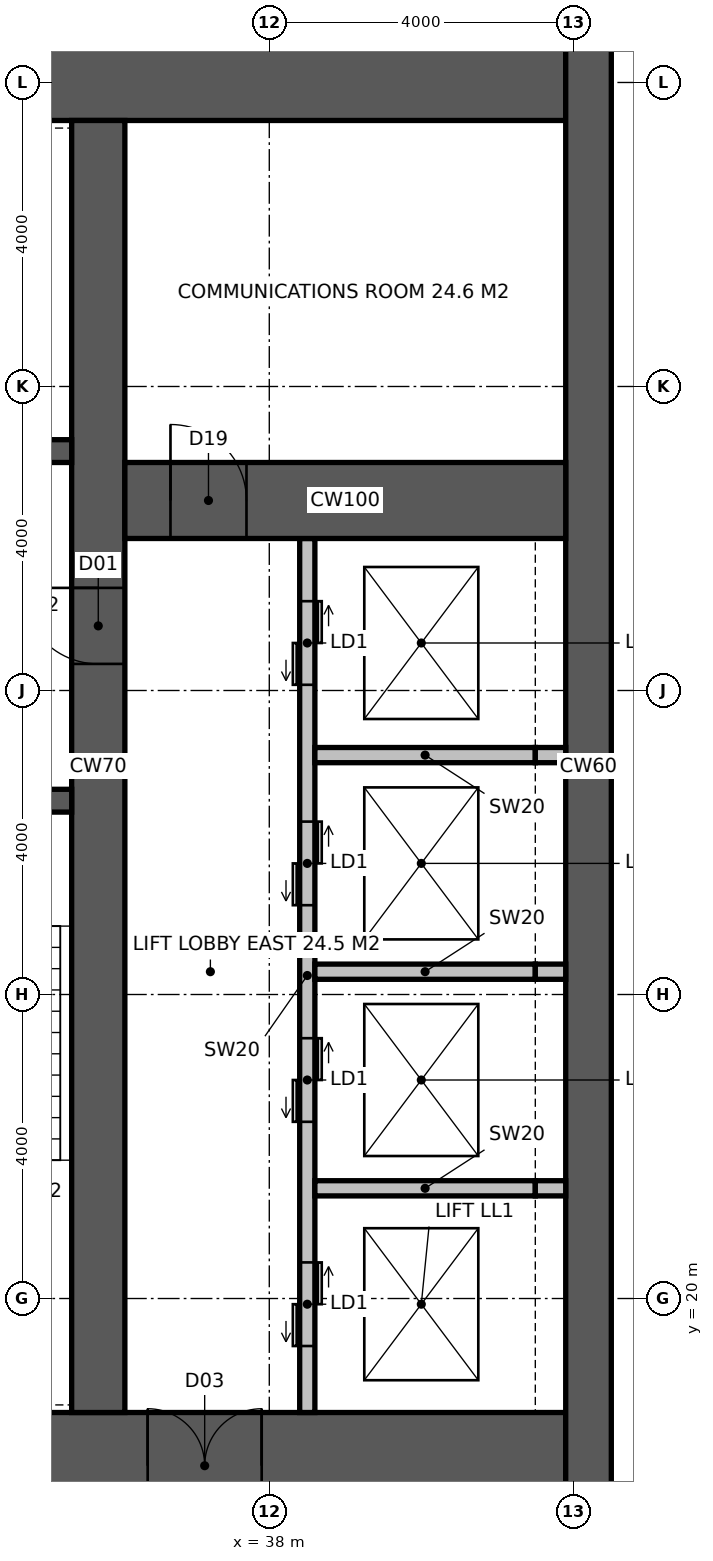
"""IFC4 building model, lengths in metres.
Left out: names, types, materials, properties, quantities, classifications, styles, units other than length and angle.
Written with IfcOpenShell. Run it as: python <this file> out.ifc"""

import sys

from ifc_helpers import new_model, si_unit, direction, frame, frame_2d, origin, place, context, subcontext, project, spatial, rectangle, extrude, element, fill, save


model = new_model("IFC4")
c1 = context("Model", 3, precision=1e-05, world=origin(), true_north=direction((0.0, 1.0)))
c2 = subcontext(c1, "Body", "Model", "MODEL_VIEW")
j1 = project(units=[si_unit("LENGTHUNIT", "METRE"), si_unit("PLANEANGLEUNIT", "RADIAN")], contexts=[c1])
p1 = place(None, origin())
s1 = spatial("IfcSite", under=j1, at=p1, CompositionType="ELEMENT")
p2 = place(p1, origin())
s2 = spatial("IfcBuilding", under=s1, at=p2, CompositionType="ELEMENT")
p3 = place(p2, frame((0.0, 0.0, 47.0)))
s3 = spatial("IfcBuildingStorey", under=s2, at=p3, CompositionType="ELEMENT", Elevation=47.0)
p4 = place(p3, frame((18.5, 17.8, -0.15), z_axis=(0.0, 0.0, 1.0), x_axis=(1.0, 0.0, 0.0)))
e1 = element("IfcWall", 1, at=p4, inside=s3, PredefinedType="SHEAR", context=c2, shape_type="SweptSolid", body=[
    extrude(rectangle(XDim=23.4, YDim=1.4, at=frame_2d((11.7, 0.0))), origin(), (0.0, 0.0, 1.0), 4.0),
])
p5 = place(p4, frame((3.45, 0.0, 0.15)))
e2 = element("IfcOpeningElement", 2, at=p5, cuts=e1, PredefinedType="OPENING", context=c2, shape_type="SweptSolid", body=[
    extrude(rectangle(XDim=1.5, YDim=2.4, at=frame_2d((0.75, 1.2))), frame((0.0, 0.71, 0.0), z_axis=(0.0, -1.0, 0.0), x_axis=(1.0, 0.0, 0.0)), (0.0, 0.0, 1.0), 1.42),
])
p6 = place(p4, frame((17.9, 0.0, 0.15)))
e3 = element("IfcOpeningElement", 3, at=p6, cuts=e1, PredefinedType="OPENING", context=c2, shape_type="SweptSolid", body=[
    extrude(rectangle(XDim=1.5, YDim=2.4, at=frame_2d((0.75, 1.2))), frame((0.0, 0.71, 0.0), z_axis=(0.0, -1.0, 0.0), x_axis=(1.0, 0.0, 0.0)), (0.0, 0.0, 1.0), 1.42),
])
p7 = place(p4, frame((0.9, 0.0, 0.15)))
e4 = element("IfcOpeningElement", 4, at=p7, cuts=e1, PredefinedType="OPENING", context=c2, shape_type="SweptSolid", body=[
    extrude(rectangle(XDim=1.0, YDim=2.2, at=frame_2d((0.5, 1.1))), frame((0.0, 0.71, 0.0), z_axis=(0.0, -1.0, 0.0), x_axis=(1.0, 0.0, 0.0)), (0.0, 0.0, 1.0), 1.42),
])
p8 = place(p3, frame((18.5, 36.2, -0.15), z_axis=(0.0, 0.0, 1.0), x_axis=(1.0, 0.0, 0.0)))
e5 = element("IfcWall", 5, at=p8, inside=s3, PredefinedType="SHEAR", context=c2, shape_type="SweptSolid", body=[
    extrude(rectangle(XDim=23.4, YDim=1.4, at=frame_2d((11.7, 0.0))), origin(), (0.0, 0.0, 1.0), 4.0),
])
p9 = place(p3, frame((42.2, 17.1, -0.15), z_axis=(0.0, 0.0, 1.0), x_axis=(0.0, 1.0, 0.0)))
e6 = element("IfcWall", 6, at=p9, inside=s3, PredefinedType="SHEAR", context=c2, shape_type="SweptSolid", body=[
    extrude(rectangle(XDim=19.8, YDim=0.6, at=frame_2d((9.9, 0.0))), origin(), (0.0, 0.0, 1.0), 4.0),
])
p10 = place(p3, frame((35.75, 18.5, -0.15), z_axis=(0.0, 0.0, 1.0), x_axis=(0.0, 1.0, 0.0)))
e7 = element("IfcWall", 7, at=p10, inside=s3, PredefinedType="SHEAR", context=c2, shape_type="SweptSolid", body=[
    extrude(rectangle(XDim=17.0, YDim=0.7, at=frame_2d((8.5, 0.0))), origin(), (0.0, 0.0, 1.0), 4.0),
])
p11 = place(p10, frame((9.85, 0.0, 0.15)))
e8 = element("IfcOpeningElement", 8, at=p11, cuts=e7, PredefinedType="OPENING", context=c2, shape_type="SweptSolid", body=[
    extrude(rectangle(XDim=1.0, YDim=2.2, at=frame_2d((0.5, 1.1))), frame((0.0, 0.36, 0.0), z_axis=(0.0, -1.0, 0.0), x_axis=(1.0, 0.0, 0.0)), (0.0, 0.0, 1.0), 0.72),
])
p12 = place(p3, frame((24.15, 26.55, -0.15), z_axis=(0.0, 0.0, 1.0), x_axis=(1.0, 0.0, 0.0)))
e9 = element("IfcWall", 9, at=p12, inside=s3, PredefinedType="SHEAR", context=c2, shape_type="SweptSolid", body=[
    extrude(rectangle(XDim=11.25, YDim=0.3, at=frame_2d((5.625, 0.0))), origin(), (0.0, 0.0, 1.0), 4.0),
])
p13 = place(p12, frame((9.25, 0.0, 0.15)))
e10 = element("IfcOpeningElement", 10, at=p13, cuts=e9, PredefinedType="OPENING", context=c2, shape_type="SweptSolid", body=[
    extrude(rectangle(XDim=1.0, YDim=2.2, at=frame_2d((0.5, 1.1))), frame((0.0, 0.16, 0.0), z_axis=(0.0, -1.0, 0.0), x_axis=(1.0, 0.0, 0.0)), (0.0, 0.0, 1.0), 0.32),
])
p14 = place(p12, frame((4.9, 0.0, 0.15)))
e11 = element("IfcOpeningElement", 11, at=p14, cuts=e9, PredefinedType="OPENING", context=c2, shape_type="SweptSolid", body=[
    extrude(rectangle(XDim=1.5, YDim=2.4, at=frame_2d((0.75, 1.2))), frame((0.0, 0.16, 0.0), z_axis=(0.0, -1.0, 0.0), x_axis=(1.0, 0.0, 0.0)), (0.0, 0.0, 1.0), 0.32),
])
p15 = place(p3, frame((24.15, 31.15, -0.15), z_axis=(0.0, 0.0, 1.0), x_axis=(1.0, 0.0, 0.0)))
e12 = element("IfcWall", 12, at=p15, inside=s3, PredefinedType="SHEAR", context=c2, shape_type="SweptSolid", body=[
    extrude(rectangle(XDim=11.25, YDim=0.3, at=frame_2d((5.625, 0.0))), origin(), (0.0, 0.0, 1.0), 4.0),
])
p16 = place(p15, frame((7.25, 0.0, 0.15)))
e13 = element("IfcOpeningElement", 13, at=p16, cuts=e12, PredefinedType="OPENING", context=c2, shape_type="SweptSolid", body=[
    extrude(rectangle(XDim=1.4, YDim=2.4, at=frame_2d((0.7, 1.2))), frame((0.0, 0.16, 0.0), z_axis=(0.0, -1.0, 0.0), x_axis=(1.0, 0.0, 0.0)), (0.0, 0.0, 1.0), 0.32),
])
p17 = place(p3, frame((38.5, 18.5, -0.15), z_axis=(0.0, 0.0, 1.0), x_axis=(0.0, 1.0, 0.0)))
e14 = element("IfcWall", 14, at=p17, inside=s3, PredefinedType="SOLIDWALL", context=c2, shape_type="SweptSolid", body=[
    extrude(rectangle(XDim=11.5, YDim=0.2, at=frame_2d((5.75, 0.0))), origin(), (0.0, 0.0, 1.0), 4.0),
])
p18 = place(p17, frame((0.875, 0.0, 0.15)))
e15 = element("IfcOpeningElement", 15, at=p18, cuts=e14, PredefinedType="OPENING", context=c2, shape_type="SweptSolid", body=[
    extrude(rectangle(XDim=1.1, YDim=2.2, at=frame_2d((0.55, 1.1))), frame((0.0, 0.11, 0.0), z_axis=(0.0, -1.0, 0.0), x_axis=(1.0, 0.0, 0.0)), (0.0, 0.0, 1.0), 0.22),
])
p19 = place(p17, frame((3.825, 0.0, 0.15)))
e16 = element("IfcOpeningElement", 16, at=p19, cuts=e14, PredefinedType="OPENING", context=c2, shape_type="SweptSolid", body=[
    extrude(rectangle(XDim=1.1, YDim=2.2, at=frame_2d((0.55, 1.1))), frame((0.0, 0.11, 0.0), z_axis=(0.0, -1.0, 0.0), x_axis=(1.0, 0.0, 0.0)), (0.0, 0.0, 1.0), 0.22),
])
p20 = place(p17, frame((6.675, 0.0, 0.15)))
e17 = element("IfcOpeningElement", 17, at=p20, cuts=e14, PredefinedType="OPENING", context=c2, shape_type="SweptSolid", body=[
    extrude(rectangle(XDim=1.1, YDim=2.2, at=frame_2d((0.55, 1.1))), frame((0.0, 0.11, 0.0), z_axis=(0.0, -1.0, 0.0), x_axis=(1.0, 0.0, 0.0)), (0.0, 0.0, 1.0), 0.22),
])
p21 = place(p17, frame((9.575, 0.0, 0.15)))
e18 = element("IfcOpeningElement", 18, at=p21, cuts=e14, PredefinedType="OPENING", context=c2, shape_type="SweptSolid", body=[
    extrude(rectangle(XDim=1.1, YDim=2.2, at=frame_2d((0.55, 1.1))), frame((0.0, 0.11, 0.0), z_axis=(0.0, -1.0, 0.0), x_axis=(1.0, 0.0, 0.0)), (0.0, 0.0, 1.0), 0.22),
])
p22 = place(p3, frame((36.1, 30.5, -0.15), z_axis=(0.0, 0.0, 1.0), x_axis=(1.0, 0.0, 0.0)))
e19 = element("IfcWall", 19, at=p22, inside=s3, PredefinedType="SHEAR", context=c2, shape_type="SweptSolid", body=[
    extrude(rectangle(XDim=5.8, YDim=1.0, at=frame_2d((2.9, 0.0))), origin(), (0.0, 0.0, 1.0), 4.0),
])
p23 = place(p22, frame((0.6, 0.0, 0.15)))
e20 = element("IfcOpeningElement", 20, at=p23, cuts=e19, PredefinedType="OPENING", context=c2, shape_type="SweptSolid", body=[
    extrude(rectangle(XDim=1.0, YDim=2.2, at=frame_2d((0.5, 1.1))), frame((0.0, 0.51, 0.0), z_axis=(0.0, -1.0, 0.0), x_axis=(1.0, 0.0, 0.0)), (0.0, 0.0, 1.0), 1.02),
])
p24 = place(p3, frame((38.6, 21.45, -0.15), z_axis=(0.0, 0.0, 1.0), x_axis=(1.0, 0.0, 0.0)))
e21 = element("IfcWall", 21, at=p24, inside=s3, PredefinedType="SOLIDWALL", context=c2, shape_type="SweptSolid", body=[
    extrude(rectangle(XDim=2.9, YDim=0.2, at=frame_2d((1.45, 0.0))), origin(), (0.0, 0.0, 1.0), 4.0),
])
p25 = place(p3, frame((41.5, 21.45, -0.15), z_axis=(0.0, 0.0, 1.0), x_axis=(1.0, 0.0, 0.0)))
e22 = element("IfcWall", 22, at=p25, inside=s3, PredefinedType="SOLIDWALL", context=c2, shape_type="SweptSolid", body=[
    extrude(rectangle(XDim=0.4, YDim=0.2, at=frame_2d((0.2, 0.0))), origin(), (0.0, 0.0, 1.0), 4.0),
])
p26 = place(p3, frame((38.6, 24.3, -0.15), z_axis=(0.0, 0.0, 1.0), x_axis=(1.0, 0.0, 0.0)))
e23 = element("IfcWall", 23, at=p26, inside=s3, PredefinedType="SOLIDWALL", context=c2, shape_type="SweptSolid", body=[
    extrude(rectangle(XDim=2.9, YDim=0.2, at=frame_2d((1.45, 0.0))), origin(), (0.0, 0.0, 1.0), 4.0),
])
p27 = place(p3, frame((41.5, 24.3, -0.15), z_axis=(0.0, 0.0, 1.0), x_axis=(1.0, 0.0, 0.0)))
e24 = element("IfcWall", 24, at=p27, inside=s3, PredefinedType="SOLIDWALL", context=c2, shape_type="SweptSolid", body=[
    extrude(rectangle(XDim=0.4, YDim=0.2, at=frame_2d((0.2, 0.0))), origin(), (0.0, 0.0, 1.0), 4.0),
])
p28 = place(p3, frame((38.6, 27.15, -0.15), z_axis=(0.0, 0.0, 1.0), x_axis=(1.0, 0.0, 0.0)))
e25 = element("IfcWall", 25, at=p28, inside=s3, PredefinedType="SOLIDWALL", context=c2, shape_type="SweptSolid", body=[
    extrude(rectangle(XDim=2.9, YDim=0.2, at=frame_2d((1.45, 0.0))), origin(), (0.0, 0.0, 1.0), 4.0),
])
p29 = place(p3, frame((41.5, 27.15, -0.15), z_axis=(0.0, 0.0, 1.0), x_axis=(1.0, 0.0, 0.0)))
e26 = element("IfcWall", 26, at=p29, inside=s3, PredefinedType="SOLIDWALL", context=c2, shape_type="SweptSolid", body=[
    extrude(rectangle(XDim=0.4, YDim=0.2, at=frame_2d((0.2, 0.0))), origin(), (0.0, 0.0, 1.0), 4.0),
])
p30 = place(p11, origin())
e27 = element("IfcDoor", 27, at=p30, inside=s3, OperationType="SINGLE_SWING_RIGHT", PredefinedType="DOOR", context=c2, shape_type="SweptSolid", body=[
    extrude(rectangle(XDim=1.0, YDim=2.2, at=frame_2d((0.5, 1.1))), frame((0.0, 0.025, 0.0), z_axis=(0.0, -1.0, 0.0), x_axis=(1.0, 0.0, 0.0)), (0.0, 0.0, 1.0), 0.05),
])
fill(e8, e27)
p31 = place(p6, origin())
e28 = element("IfcDoor", 28, at=p31, inside=s3, OperationType="DOUBLE_DOOR_DOUBLE_SWING", PredefinedType="DOOR", context=c2, shape_type="SweptSolid", body=[
    extrude(rectangle(XDim=1.5, YDim=2.4, at=frame_2d((0.75, 1.2))), frame((0.0, 0.025, 0.0), z_axis=(0.0, -1.0, 0.0), x_axis=(1.0, 0.0, 0.0)), (0.0, 0.0, 1.0), 0.05),
])
fill(e3, e28)
p32 = place(p23, origin())
e29 = element("IfcDoor", 29, at=p32, inside=s3, OperationType="SINGLE_SWING_LEFT", PredefinedType="DOOR", context=c2, shape_type="SweptSolid", body=[
    extrude(rectangle(XDim=1.0, YDim=2.2, at=frame_2d((0.5, 1.1))), frame((0.0, 0.025, 0.0), z_axis=(0.0, -1.0, 0.0), x_axis=(1.0, 0.0, 0.0)), (0.0, 0.0, 1.0), 0.05),
])
fill(e20, e29)
p33 = place(p18, origin())
e30 = element("IfcDoor", 30, at=p33, inside=s3, OperationType="DOUBLE_DOOR_SLIDING", PredefinedType="DOOR", context=c2, shape_type="SweptSolid", body=[
    extrude(rectangle(XDim=1.1, YDim=2.2, at=frame_2d((0.55, 1.1))), frame((0.0, 0.025, 0.0), z_axis=(0.0, -1.0, 0.0), x_axis=(1.0, 0.0, 0.0)), (0.0, 0.0, 1.0), 0.05),
])
fill(e15, e30)
p34 = place(p19, origin())
e31 = element("IfcDoor", 31, at=p34, inside=s3, OperationType="DOUBLE_DOOR_SLIDING", PredefinedType="DOOR", context=c2, shape_type="SweptSolid", body=[
    extrude(rectangle(XDim=1.1, YDim=2.2, at=frame_2d((0.55, 1.1))), frame((0.0, 0.025, 0.0), z_axis=(0.0, -1.0, 0.0), x_axis=(1.0, 0.0, 0.0)), (0.0, 0.0, 1.0), 0.05),
])
fill(e16, e31)
p35 = place(p20, origin())
e32 = element("IfcDoor", 32, at=p35, inside=s3, OperationType="DOUBLE_DOOR_SLIDING", PredefinedType="DOOR", context=c2, shape_type="SweptSolid", body=[
    extrude(rectangle(XDim=1.1, YDim=2.2, at=frame_2d((0.55, 1.1))), frame((0.0, 0.025, 0.0), z_axis=(0.0, -1.0, 0.0), x_axis=(1.0, 0.0, 0.0)), (0.0, 0.0, 1.0), 0.05),
])
fill(e17, e32)
p36 = place(p21, origin())
e33 = element("IfcDoor", 33, at=p36, inside=s3, OperationType="DOUBLE_DOOR_SLIDING", PredefinedType="DOOR", context=c2, shape_type="SweptSolid", body=[
    extrude(rectangle(XDim=1.1, YDim=2.2, at=frame_2d((0.55, 1.1))), frame((0.0, 0.025, 0.0), z_axis=(0.0, -1.0, 0.0), x_axis=(1.0, 0.0, 0.0)), (0.0, 0.0, 1.0), 0.05),
])
fill(e18, e33)
save(model, sys.argv[1])
